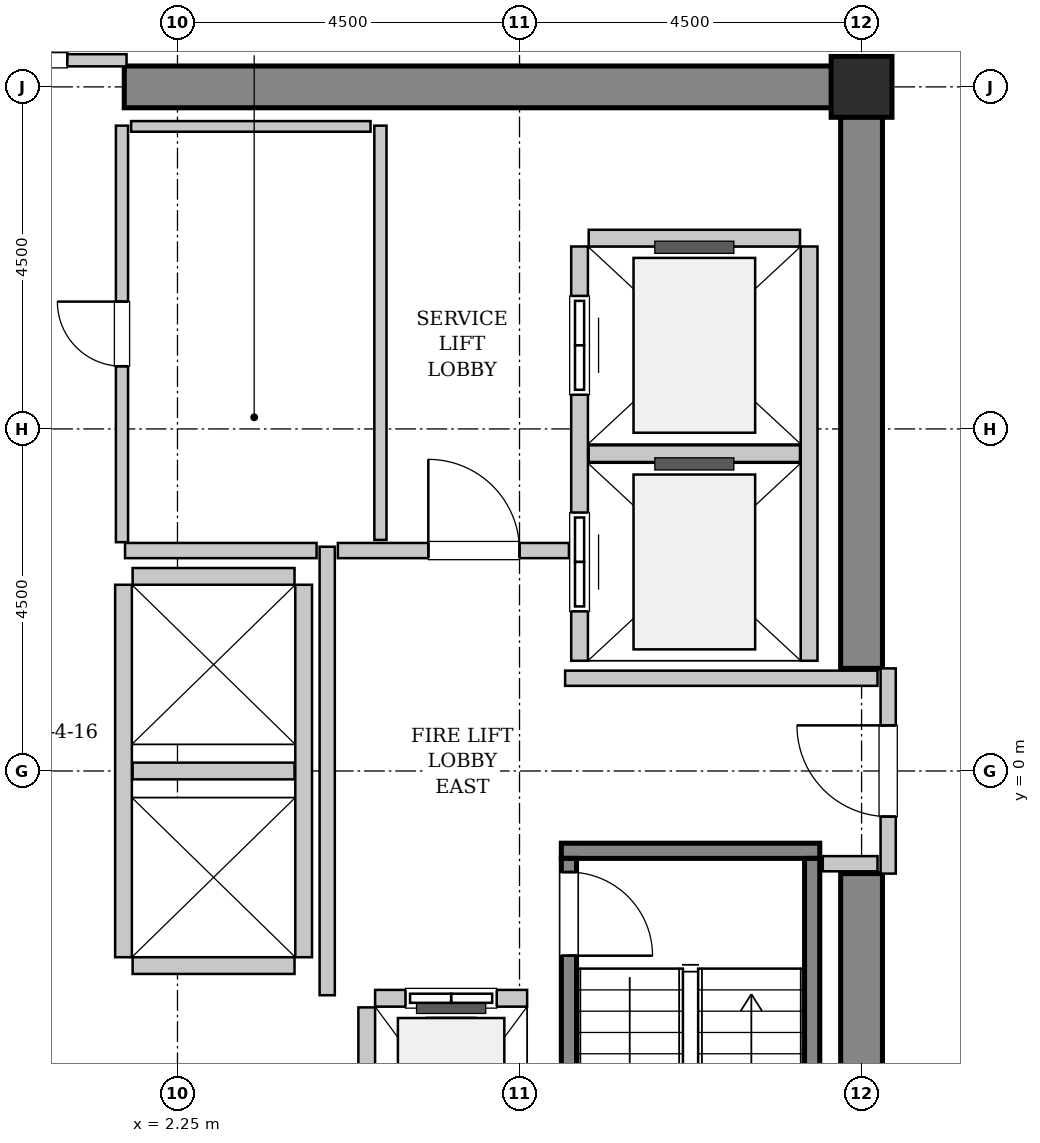
"""IFC4 building model, lengths in metres.
Left out: names, types, materials, properties, quantities, classifications, styles, units other than length and angle.
Written with IfcOpenShell. Run it as: python <this file> out.ifc"""

import sys

from ifc_helpers import new_model, si_unit, direction, frame, frame_2d, origin, origin_2d, place, context, subcontext, project, spatial, rectangle, hollow_rectangle, extrude, source, transform, mapped, element, fill, save


model = new_model("IFC4")
c1 = context("Model", 3, precision=1e-05, world=origin(), true_north=direction((0.0, 1.0)))
c2 = subcontext(c1, "Body", "Model", "MODEL_VIEW")
j1 = project(units=[si_unit("LENGTHUNIT", "METRE"), si_unit("PLANEANGLEUNIT", "RADIAN")], contexts=[c1])
p1 = place(None, origin())
s1 = spatial("IfcSite", under=j1, at=p1, CompositionType="ELEMENT")
p2 = place(p1, origin())
s2 = spatial("IfcBuilding", under=s1, at=p2, CompositionType="ELEMENT")
p3 = place(p2, frame((0.0, 0.0, 190.6)))
s3 = spatial("IfcBuildingStorey", under=s2, at=p3, CompositionType="ELEMENT", Elevation=190.6)
m1 = source(origin(), c2, "Body", "SweptSolid", [
    extrude(rectangle(XDim=9.975, YDim=0.55, at=frame_2d((4.987, 0.0))), origin(), (0.0, 0.0, 1.0), 3.8),
])
p4 = place(p3, frame((1.55, 9.0, 0.0), z_axis=(0.0, 0.0, 1.0), x_axis=(1.0, 0.0, 0.0)))
e1 = element("IfcWall", 1, at=p4, inside=s3, PredefinedType="SHEAR", context=c2, shape_type="MappedRepresentation", body=[
    mapped(m1, transform((0.0, 0.0, 0.0), x_axis=(1.0, 0.0, 0.0), y_axis=(0.0, 1.0, 0.0), z_axis=(0.0, 0.0, 1.0), scale=1.0)),
])
m2 = source(origin(), c2, "Body", "SweptSolid", [
    extrude(rectangle(XDim=7.375, YDim=0.55, at=frame_2d((3.688, 0.0))), origin(), (0.0, 0.0, 1.0), 3.8),
])
for number, where, z_axis, x_axis in (
    (2, (11.25, -8.725, 0.0), (0.0, 0.0, 1.0), (0.0, 1.0, 0.0)),
    (3, (11.25, 1.35, 0.0), (0.0, 0.0, 1.0), (0.0, 1.0, 0.0)),
):
    element("IfcWall", number, at=place(p3, frame(where, z_axis=z_axis, x_axis=x_axis)), inside=s3, PredefinedType="SHEAR", context=c2, shape_type="MappedRepresentation", body=[
        mapped(m2, transform((0.0, 0.0, 0.0), x_axis=(1.0, 0.0, 0.0), y_axis=(0.0, 1.0, 0.0), z_axis=(0.0, 0.0, 1.0), scale=1.0)),
    ])
m3 = source(origin(), c2, "Body", "SweptSolid", [
    extrude(hollow_rectangle(XDim=0.8, YDim=0.8, WallThickness=0.04, InnerFilletRadius=0.04, OuterFilletRadius=0.08, at=origin_2d()), origin(), (0.0, 0.0, 1.0), 3.8),
])
p5 = place(p3, frame((11.25, 9.0, 0.0), z_axis=(0.0, 0.0, 1.0), x_axis=(1.0, 0.0, 0.0)))
e4 = element("IfcColumn", 4, at=p5, inside=s3, PredefinedType="COLUMN", context=c2, shape_type="MappedRepresentation", body=[
    mapped(m3, transform((0.0, 0.0, 0.0), x_axis=(1.0, 0.0, 0.0), y_axis=(0.0, 1.0, 0.0), z_axis=(0.0, 0.0, 1.0), scale=1.0)),
])
m4 = source(origin(), c2, "Body", "SweptSolid", [
    extrude(rectangle(XDim=3.4, YDim=0.2, at=frame_2d((1.7, 0.0))), origin(), (0.0, 0.0, 1.0), 3.8),
])
p6 = place(p3, frame((7.3, -1.05, 0.0), z_axis=(0.0, 0.0, 1.0), x_axis=(1.0, 0.0, 0.0)))
e5 = element("IfcWall", 5, at=p6, inside=s3, PredefinedType="SOLIDWALL", context=c2, shape_type="MappedRepresentation", body=[
    mapped(m4, transform((0.0, 0.0, 0.0), x_axis=(1.0, 0.0, 0.0), y_axis=(0.0, 1.0, 0.0), z_axis=(0.0, 0.0, 1.0), scale=1.0)),
])
m5 = source(origin(), c2, "Body", "SweptSolid", [
    extrude(rectangle(XDim=7.1, YDim=0.2, at=frame_2d((3.55, 0.0))), origin(), (0.0, 0.0, 1.0), 3.8),
])
p7 = place(p3, frame((7.4, -1.15, 0.0), z_axis=(0.0, 0.0, 1.0), x_axis=(0.0, -1.0, 0.0)))
e6 = element("IfcWall", 6, at=p7, inside=s3, PredefinedType="SOLIDWALL", context=c2, shape_type="MappedRepresentation", body=[
    mapped(m5, transform((0.0, 0.0, 0.0), x_axis=(1.0, 0.0, 0.0), y_axis=(0.0, 1.0, 0.0), z_axis=(0.0, 0.0, 1.0), scale=1.0)),
])
p8 = place(p7, frame((0.18, 0.0, 0.0)))
e7 = element("IfcOpeningElement", 7, at=p8, cuts=e6, PredefinedType="OPENING", context=c2, shape_type="SweptSolid", body=[
    extrude(rectangle(XDim=1.1, YDim=2.15, at=frame_2d((0.55, 1.075))), frame((0.0, 0.11, 0.0), z_axis=(0.0, -1.0, 0.0), x_axis=(1.0, 0.0, 0.0)), (0.0, 0.0, 1.0), 0.22),
])
p9 = place(p3, frame((10.6, -1.15, 0.0), z_axis=(0.0, 0.0, 1.0), x_axis=(0.0, -1.0, 0.0)))
e8 = element("IfcWall", 8, at=p9, inside=s3, PredefinedType="SOLIDWALL", context=c2, shape_type="MappedRepresentation", body=[
    mapped(m5, transform((0.0, 0.0, 0.0), x_axis=(1.0, 0.0, 0.0), y_axis=(0.0, 1.0, 0.0), z_axis=(0.0, 0.0, 1.0), scale=1.0)),
])
m6 = source(origin(), c2, "Body", "SweptSolid", [
    extrude(rectangle(XDim=2.0, YDim=0.22, at=frame_2d((1.0, 0.0))), origin(), (0.0, 0.0, 1.0), 3.535),
])
p10 = place(p3, frame((6.85, -2.99, 0.0), z_axis=(0.0, 0.0, 1.0), x_axis=(-1.0, 0.0, 0.0)))
e9 = element("IfcWall", 9, at=p10, inside=s3, PredefinedType="SOLIDWALL", context=c2, shape_type="MappedRepresentation", body=[
    mapped(m6, transform((0.0, 0.0, 0.0), x_axis=(1.0, 0.0, 0.0), y_axis=(0.0, 1.0, 0.0), z_axis=(0.0, 0.0, 1.0), scale=1.0)),
])
p11 = place(p10, frame((0.4, 0.0, 0.0)))
e10 = element("IfcOpeningElement", 10, at=p11, cuts=e9, PredefinedType="OPENING", context=c2, shape_type="SweptSolid", body=[
    extrude(rectangle(XDim=1.2, YDim=2.2, at=frame_2d((0.6, 1.1))), frame((0.0, 0.12, 0.0), z_axis=(0.0, -1.0, 0.0), x_axis=(1.0, 0.0, 0.0)), (0.0, 0.0, 1.0), 0.24),
])
m7 = source(origin(), c2, "Body", "SweptSolid", [
    extrude(rectangle(XDim=2.68, YDim=0.22, at=frame_2d((1.34, 0.0))), origin(), (0.0, 0.0, 1.0), 3.535),
])
p12 = place(p3, frame((4.74, -3.11, 0.0), z_axis=(0.0, 0.0, 1.0), x_axis=(0.0, -1.0, 0.0)))
e11 = element("IfcWall", 11, at=p12, inside=s3, PredefinedType="SOLIDWALL", context=c2, shape_type="MappedRepresentation", body=[
    mapped(m7, transform((0.0, 0.0, 0.0), x_axis=(1.0, 0.0, 0.0), y_axis=(0.0, 1.0, 0.0), z_axis=(0.0, 0.0, 1.0), scale=1.0)),
])
m8 = source(origin(), c2, "Body", "SweptSolid", [
    extrude(rectangle(XDim=5.45, YDim=0.22, at=frame_2d((2.725, 0.0))), origin(), (0.0, 0.0, 1.0), 3.535),
])
p13 = place(p3, frame((7.54, 6.9, 0.0), z_axis=(0.0, 0.0, 1.0), x_axis=(0.0, -1.0, 0.0)))
e12 = element("IfcWall", 12, at=p13, inside=s3, PredefinedType="SOLIDWALL", context=c2, shape_type="MappedRepresentation", body=[
    mapped(m8, transform((0.0, 0.0, 0.0), x_axis=(1.0, 0.0, 0.0), y_axis=(0.0, 1.0, 0.0), z_axis=(0.0, 0.0, 1.0), scale=1.0)),
])
p14 = place(p13, frame((3.5, 0.0, 0.0)))
e13 = element("IfcOpeningElement", 13, at=p14, cuts=e12, PredefinedType="OPENING", context=c2, shape_type="SweptSolid", body=[
    extrude(rectangle(XDim=1.3, YDim=2.3, at=frame_2d((0.65, 1.15))), frame((0.0, 0.12, 0.0), z_axis=(0.0, -1.0, 0.0), x_axis=(1.0, 0.0, 0.0)), (0.0, 0.0, 1.0), 0.24),
])
p15 = place(p13, frame((0.65, 0.0, 0.0)))
e14 = element("IfcOpeningElement", 14, at=p15, cuts=e12, PredefinedType="OPENING", context=c2, shape_type="SweptSolid", body=[
    extrude(rectangle(XDim=1.3, YDim=2.3, at=frame_2d((0.65, 1.15))), frame((0.0, 0.12, 0.0), z_axis=(0.0, -1.0, 0.0), x_axis=(1.0, 0.0, 0.0)), (0.0, 0.0, 1.0), 0.24),
])
p16 = place(p3, frame((10.56, 1.45, 0.0), z_axis=(0.0, 0.0, 1.0), x_axis=(0.0, 1.0, 0.0)))
e15 = element("IfcWall", 15, at=p16, inside=s3, PredefinedType="SOLIDWALL", context=c2, shape_type="MappedRepresentation", body=[
    mapped(m8, transform((0.0, 0.0, 0.0), x_axis=(1.0, 0.0, 0.0), y_axis=(0.0, 1.0, 0.0), z_axis=(0.0, 0.0, 1.0), scale=1.0)),
])
m9 = source(origin(), c2, "Body", "SweptSolid", [
    extrude(rectangle(XDim=2.78, YDim=0.22, at=frame_2d((1.39, 0.0))), origin(), (0.0, 0.0, 1.0), 3.535),
])
for number, where, z_axis, x_axis in (
    (16, (7.66, 4.175, 0.0), (0.0, 0.0, 1.0), (1.0, 0.0, 0.0)),
    (17, (10.44, 7.01, 0.0), (0.0, 0.0, 1.0), (-1.0, 0.0, 0.0)),
):
    element("IfcWall", number, at=place(p3, frame(where, z_axis=z_axis, x_axis=x_axis)), inside=s3, PredefinedType="SOLIDWALL", context=c2, shape_type="MappedRepresentation", body=[
        mapped(m9, transform((0.0, 0.0, 0.0), x_axis=(1.0, 0.0, 0.0), y_axis=(0.0, 1.0, 0.0), z_axis=(0.0, 0.0, 1.0), scale=1.0)),
    ])
m10 = source(origin(), c2, "Body", "SweptSolid", [
    extrude(rectangle(XDim=4.9, YDim=0.22, at=frame_2d((2.45, 0.0))), origin(), (0.0, 0.0, 1.0), 3.535),
])
for number, where, z_axis, x_axis in (
    (18, (1.54, 2.45, 0.0), (0.0, 0.0, 1.0), (0.0, -1.0, 0.0)),
    (19, (3.91, -2.45, 0.0), (0.0, 0.0, 1.0), (0.0, 1.0, 0.0)),
):
    element("IfcWall", number, at=place(p3, frame(where, z_axis=z_axis, x_axis=x_axis)), inside=s3, PredefinedType="SOLIDWALL", context=c2, shape_type="MappedRepresentation", body=[
        mapped(m10, transform((0.0, 0.0, 0.0), x_axis=(1.0, 0.0, 0.0), y_axis=(0.0, 1.0, 0.0), z_axis=(0.0, 0.0, 1.0), scale=1.0)),
    ])
m11 = source(origin(), c2, "Body", "SweptSolid", [
    extrude(rectangle(XDim=2.13, YDim=0.22, at=frame_2d((1.065, 0.0))), origin(), (0.0, 0.0, 1.0), 3.535),
])
for number, where, z_axis, x_axis in (
    (20, (1.66, -2.56, 0.0), (0.0, 0.0, 1.0), (1.0, 0.0, 0.0)),
    (21, (1.66, 0.0, 0.0), (0.0, 0.0, 1.0), (1.0, 0.0, 0.0)),
    (22, (3.79, 2.56, 0.0), (0.0, 0.0, 1.0), (-1.0, 0.0, 0.0)),
):
    element("IfcWall", number, at=place(p3, frame(where, z_axis=z_axis, x_axis=x_axis)), inside=s3, PredefinedType="SOLIDWALL", context=c2, shape_type="MappedRepresentation", body=[
        mapped(m11, transform((0.0, 0.0, 0.0), x_axis=(1.0, 0.0, 0.0), y_axis=(0.0, 1.0, 0.0), z_axis=(0.0, 0.0, 1.0), scale=1.0)),
    ])
m12 = source(origin(), c2, "Body", "SweptSolid", [
    extrude(rectangle(XDim=2.7, YDim=0.2, at=frame_2d((1.35, 0.0))), origin(), (0.0, 0.0, 1.0), 2.425),
])
p17 = place(p3, frame((11.6, -1.35, 0.0), z_axis=(0.0, 0.0, 1.0), x_axis=(0.0, 1.0, 0.0)))
e23 = element("IfcWall", 23, at=p17, inside=s3, PredefinedType="PARTITIONING", context=c2, shape_type="MappedRepresentation", body=[
    mapped(m12, transform((0.0, 0.0, 0.0), x_axis=(1.0, 0.0, 0.0), y_axis=(0.0, 1.0, 0.0), z_axis=(0.0, 0.0, 1.0), scale=1.0)),
])
p18 = place(p17, frame((0.75, 0.0, 0.0)))
e24 = element("IfcOpeningElement", 24, at=p18, cuts=e23, PredefinedType="OPENING", context=c2, shape_type="SweptSolid", body=[
    extrude(rectangle(XDim=1.2, YDim=2.15, at=frame_2d((0.6, 1.075))), frame((0.0, 0.11, 0.0), z_axis=(0.0, -1.0, 0.0), x_axis=(1.0, 0.0, 0.0)), (0.0, 0.0, 1.0), 0.22),
])
m13 = source(origin(), c2, "Body", "SweptSolid", [
    extrude(rectangle(XDim=5.9, YDim=0.2, at=frame_2d((2.95, 0.0))), origin(), (0.0, 0.0, 1.0), 3.535),
])
p19 = place(p3, frame((4.22, -2.95, 0.0), z_axis=(0.0, 0.0, 1.0), x_axis=(0.0, 1.0, 0.0)))
e25 = element("IfcWall", 25, at=p19, inside=s3, PredefinedType="PARTITIONING", context=c2, shape_type="MappedRepresentation", body=[
    mapped(m13, transform((0.0, 0.0, 0.0), x_axis=(1.0, 0.0, 0.0), y_axis=(0.0, 1.0, 0.0), z_axis=(0.0, 0.0, 1.0), scale=1.0)),
])
m14 = source(origin(), c2, "Body", "SweptSolid", [
    extrude(rectangle(XDim=2.52, YDim=0.2, at=frame_2d((1.26, 0.0))), origin(), (0.0, 0.0, 1.0), 3.535),
])
p20 = place(p3, frame((1.56, 2.9, 0.0), z_axis=(0.0, 0.0, 1.0), x_axis=(1.0, 0.0, 0.0)))
e26 = element("IfcWall", 26, at=p20, inside=s3, PredefinedType="PARTITIONING", context=c2, shape_type="MappedRepresentation", body=[
    mapped(m14, transform((0.0, 0.0, 0.0), x_axis=(1.0, 0.0, 0.0), y_axis=(0.0, 1.0, 0.0), z_axis=(0.0, 0.0, 1.0), scale=1.0)),
])
m15 = source(origin(), c2, "Body", "SweptSolid", [
    extrude(rectangle(XDim=3.04, YDim=0.2, at=frame_2d((1.52, 0.0))), origin(), (0.0, 0.0, 1.0), 3.535),
])
p21 = place(p3, frame((4.36, 2.9, 0.0), z_axis=(0.0, 0.0, 1.0), x_axis=(1.0, 0.0, 0.0)))
e27 = element("IfcWall", 27, at=p21, inside=s3, PredefinedType="PARTITIONING", context=c2, shape_type="MappedRepresentation", body=[
    mapped(m15, transform((0.0, 0.0, 0.0), x_axis=(1.0, 0.0, 0.0), y_axis=(0.0, 1.0, 0.0), z_axis=(0.0, 0.0, 1.0), scale=1.0)),
])
p22 = place(p21, frame((1.19, 0.0, 0.0)))
e28 = element("IfcOpeningElement", 28, at=p22, cuts=e27, PredefinedType="OPENING", context=c2, shape_type="SweptSolid", body=[
    extrude(rectangle(XDim=1.2, YDim=2.15, at=frame_2d((0.6, 1.075))), frame((0.0, 0.11, 0.0), z_axis=(0.0, -1.0, 0.0), x_axis=(1.0, 0.0, 0.0)), (0.0, 0.0, 1.0), 0.22),
])
m16 = source(origin(), c2, "Body", "SweptSolid", [
    extrude(rectangle(XDim=4.11, YDim=0.2, at=frame_2d((2.055, 0.0))), origin(), (0.0, 0.0, 1.0), 3.535),
])
p23 = place(p3, frame((7.35, 1.22, 0.0), z_axis=(0.0, 0.0, 1.0), x_axis=(1.0, 0.0, 0.0)))
e29 = element("IfcWall", 29, at=p23, inside=s3, PredefinedType="PARTITIONING", context=c2, shape_type="MappedRepresentation", body=[
    mapped(m16, transform((0.0, 0.0, 0.0), x_axis=(1.0, 0.0, 0.0), y_axis=(0.0, 1.0, 0.0), z_axis=(0.0, 0.0, 1.0), scale=1.0)),
])
m17 = source(origin(), c2, "Body", "SweptSolid", [
    extrude(rectangle(XDim=0.72, YDim=0.2, at=frame_2d((0.36, 0.0))), origin(), (0.0, 0.0, 1.0), 3.535),
])
p24 = place(p3, frame((10.74, -1.22, 0.0), z_axis=(0.0, 0.0, 1.0), x_axis=(1.0, 0.0, 0.0)))
e30 = element("IfcWall", 30, at=p24, inside=s3, PredefinedType="PARTITIONING", context=c2, shape_type="MappedRepresentation", body=[
    mapped(m17, transform((0.0, 0.0, 0.0), x_axis=(1.0, 0.0, 0.0), y_axis=(0.0, 1.0, 0.0), z_axis=(0.0, 0.0, 1.0), scale=1.0)),
])
m18 = source(origin(), c2, "Body", "SweptSolid", [
    extrude(rectangle(XDim=3.16, YDim=0.16, at=frame_2d((1.58, 0.0))), origin(), (0.0, 0.0, 1.0), 2.425),
])
p25 = place(p3, frame((-1.58, 9.35, 0.0), z_axis=(0.0, 0.0, 1.0), x_axis=(1.0, 0.0, 0.0)))
e31 = element("IfcWall", 31, at=p25, inside=s3, PredefinedType="PARTITIONING", context=c2, shape_type="MappedRepresentation", body=[
    mapped(m18, transform((0.0, 0.0, 0.0), x_axis=(1.0, 0.0, 0.0), y_axis=(0.0, 1.0, 0.0), z_axis=(0.0, 0.0, 1.0), scale=1.0)),
])
p26 = place(p25, frame((0.78, 0.0, 0.0)))
e32 = element("IfcOpeningElement", 32, at=p26, cuts=e31, PredefinedType="OPENING", context=c2, shape_type="SweptSolid", body=[
    extrude(rectangle(XDim=1.6, YDim=2.3, at=frame_2d((0.8, 1.15))), frame((0.0, 0.09, 0.0), z_axis=(0.0, -1.0, 0.0), x_axis=(1.0, 0.0, 0.0)), (0.0, 0.0, 1.0), 0.18),
])
m19 = source(origin(), c2, "Body", "SweptSolid", [
    extrude(rectangle(XDim=5.45, YDim=0.16, at=frame_2d((2.725, 0.0))), origin(), (0.0, 0.0, 1.0), 3.535),
])
p27 = place(p3, frame((4.92, 3.04, 0.0), z_axis=(0.0, 0.0, 1.0), x_axis=(0.0, 1.0, 0.0)))
e33 = element("IfcWall", 33, at=p27, inside=s3, PredefinedType="PARTITIONING", context=c2, shape_type="MappedRepresentation", body=[
    mapped(m19, transform((0.0, 0.0, 0.0), x_axis=(1.0, 0.0, 0.0), y_axis=(0.0, 1.0, 0.0), z_axis=(0.0, 0.0, 1.0), scale=1.0)),
])
m20 = source(origin(), c2, "Body", "SweptSolid", [
    extrude(rectangle(XDim=5.48, YDim=0.16, at=frame_2d((2.74, 0.0))), origin(), (0.0, 0.0, 1.0), 3.535),
])
p28 = place(p3, frame((1.52, 3.01, 0.0), z_axis=(0.0, 0.0, 1.0), x_axis=(0.0, 1.0, 0.0)))
e34 = element("IfcWall", 34, at=p28, inside=s3, PredefinedType="PARTITIONING", context=c2, shape_type="MappedRepresentation", body=[
    mapped(m20, transform((0.0, 0.0, 0.0), x_axis=(1.0, 0.0, 0.0), y_axis=(0.0, 1.0, 0.0), z_axis=(0.0, 0.0, 1.0), scale=1.0)),
])
p29 = place(p28, frame((2.315, 0.0, 0.0)))
e35 = element("IfcOpeningElement", 35, at=p29, cuts=e34, PredefinedType="OPENING", context=c2, shape_type="SweptSolid", body=[
    extrude(rectangle(XDim=0.85, YDim=2.1, at=frame_2d((0.425, 1.05))), frame((0.0, 0.09, 0.0), z_axis=(0.0, -1.0, 0.0), x_axis=(1.0, 0.0, 0.0)), (0.0, 0.0, 1.0), 0.18),
])
m21 = source(origin(), c2, "Body", "SweptSolid", [
    extrude(rectangle(XDim=3.15, YDim=0.14, at=frame_2d((1.575, 0.0))), origin(), (0.0, 0.0, 1.0), 3.535),
])
p30 = place(p3, frame((1.64, 8.48, 0.0), z_axis=(0.0, 0.0, 1.0), x_axis=(1.0, 0.0, 0.0)))
e36 = element("IfcWall", 36, at=p30, inside=s3, PredefinedType="PARTITIONING", context=c2, shape_type="MappedRepresentation", body=[
    mapped(m21, transform((0.0, 0.0, 0.0), x_axis=(1.0, 0.0, 0.0), y_axis=(0.0, 1.0, 0.0), z_axis=(0.0, 0.0, 1.0), scale=1.0)),
])
m22 = source(origin(), c2, "Body", "SweptSolid", [
    extrude(rectangle(XDim=1.1, YDim=2.15, at=frame_2d((0.55, 1.075))), frame((0.0, 0.025, 0.0), z_axis=(0.0, -1.0, 0.0), x_axis=(1.0, 0.0, 0.0)), (0.0, 0.0, 1.0), 0.05),
])
p31 = place(p8, origin())
e37 = element("IfcDoor", 37, at=p31, inside=s3, OperationType="SINGLE_SWING_RIGHT", PredefinedType="DOOR", context=c2, shape_type="MappedRepresentation", body=[
    mapped(m22, transform((0.0, 0.0, 0.0), x_axis=(1.0, 0.0, 0.0), y_axis=(0.0, 1.0, 0.0), z_axis=(0.0, 0.0, 1.0), scale=1.0)),
])
fill(e7, e37)
m23 = source(origin(), c2, "Body", "SweptSolid", [
    extrude(rectangle(XDim=1.2, YDim=2.2, at=frame_2d((0.6, 1.1))), frame((0.0, 0.025, 0.0), z_axis=(0.0, -1.0, 0.0), x_axis=(1.0, 0.0, 0.0)), (0.0, 0.0, 1.0), 0.05),
])
p32 = place(p11, origin())
e38 = element("IfcDoor", 38, at=p32, inside=s3, OperationType="SLIDING_TO_LEFT", PredefinedType="DOOR", context=c2, shape_type="MappedRepresentation", body=[
    mapped(m23, transform((0.0, 0.0, 0.0), x_axis=(1.0, 0.0, 0.0), y_axis=(0.0, 1.0, 0.0), z_axis=(0.0, 0.0, 1.0), scale=1.0)),
])
fill(e10, e38)
m24 = source(origin(), c2, "Body", "SweptSolid", [
    extrude(rectangle(XDim=1.3, YDim=2.3, at=frame_2d((0.65, 1.15))), frame((0.0, 0.025, 0.0), z_axis=(0.0, -1.0, 0.0), x_axis=(1.0, 0.0, 0.0)), (0.0, 0.0, 1.0), 0.05),
])
p33 = place(p14, origin())
e39 = element("IfcDoor", 39, at=p33, inside=s3, OperationType="SLIDING_TO_RIGHT", PredefinedType="DOOR", context=c2, shape_type="MappedRepresentation", body=[
    mapped(m24, transform((0.0, 0.0, 0.0), x_axis=(1.0, 0.0, 0.0), y_axis=(0.0, 1.0, 0.0), z_axis=(0.0, 0.0, 1.0), scale=1.0)),
])
fill(e13, e39)
p34 = place(p15, origin())
e40 = element("IfcDoor", 40, at=p34, inside=s3, OperationType="SLIDING_TO_RIGHT", PredefinedType="DOOR", context=c2, shape_type="MappedRepresentation", body=[
    mapped(m24, transform((0.0, 0.0, 0.0), x_axis=(1.0, 0.0, 0.0), y_axis=(0.0, 1.0, 0.0), z_axis=(0.0, 0.0, 1.0), scale=1.0)),
])
fill(e14, e40)
m25 = source(origin(), c2, "Body", "SweptSolid", [
    extrude(rectangle(XDim=1.2, YDim=2.15, at=frame_2d((0.6, 1.075))), frame((0.0, 0.025, 0.0), z_axis=(0.0, -1.0, 0.0), x_axis=(1.0, 0.0, 0.0)), (0.0, 0.0, 1.0), 0.05),
])
p35 = place(p18, origin())
e41 = element("IfcDoor", 41, at=p35, inside=s3, OperationType="SINGLE_SWING_RIGHT", PredefinedType="DOOR", context=c2, shape_type="MappedRepresentation", body=[
    mapped(m25, transform((0.0, 0.0, 0.0), x_axis=(1.0, 0.0, 0.0), y_axis=(0.0, 1.0, 0.0), z_axis=(0.0, 0.0, 1.0), scale=1.0)),
])
fill(e24, e41)
p36 = place(p22, origin())
e42 = element("IfcDoor", 42, at=p36, inside=s3, OperationType="SINGLE_SWING_LEFT", PredefinedType="DOOR", context=c2, shape_type="MappedRepresentation", body=[
    mapped(m25, transform((0.0, 0.0, 0.0), x_axis=(1.0, 0.0, 0.0), y_axis=(0.0, 1.0, 0.0), z_axis=(0.0, 0.0, 1.0), scale=1.0)),
])
fill(e28, e42)
m26 = source(origin(), c2, "Body", "SweptSolid", [
    extrude(rectangle(XDim=1.6, YDim=2.3, at=frame_2d((0.8, 1.15))), frame((0.0, 0.025, 0.0), z_axis=(0.0, -1.0, 0.0), x_axis=(1.0, 0.0, 0.0)), (0.0, 0.0, 1.0), 0.05),
])
p37 = place(p26, origin())
e43 = element("IfcDoor", 43, at=p37, inside=s3, OperationType="DOUBLE_DOOR_SINGLE_SWING", PredefinedType="DOOR", context=c2, shape_type="MappedRepresentation", body=[
    mapped(m26, transform((0.0, 0.0, 0.0), x_axis=(1.0, 0.0, 0.0), y_axis=(0.0, 1.0, 0.0), z_axis=(0.0, 0.0, 1.0), scale=1.0)),
])
fill(e32, e43)
m27 = source(origin(), c2, "Body", "SweptSolid", [
    extrude(rectangle(XDim=0.85, YDim=2.1, at=frame_2d((0.425, 1.05))), frame((0.0, 0.025, 0.0), z_axis=(0.0, -1.0, 0.0), x_axis=(1.0, 0.0, 0.0)), (0.0, 0.0, 1.0), 0.05),
])
p38 = place(p29, origin())
e44 = element("IfcDoor", 44, at=p38, inside=s3, OperationType="SINGLE_SWING_RIGHT", PredefinedType="DOOR", context=c2, shape_type="MappedRepresentation", body=[
    mapped(m27, transform((0.0, 0.0, 0.0), x_axis=(1.0, 0.0, 0.0), y_axis=(0.0, 1.0, 0.0), z_axis=(0.0, 0.0, 1.0), scale=1.0)),
])
fill(e35, e44)
save(model, sys.argv[1])
